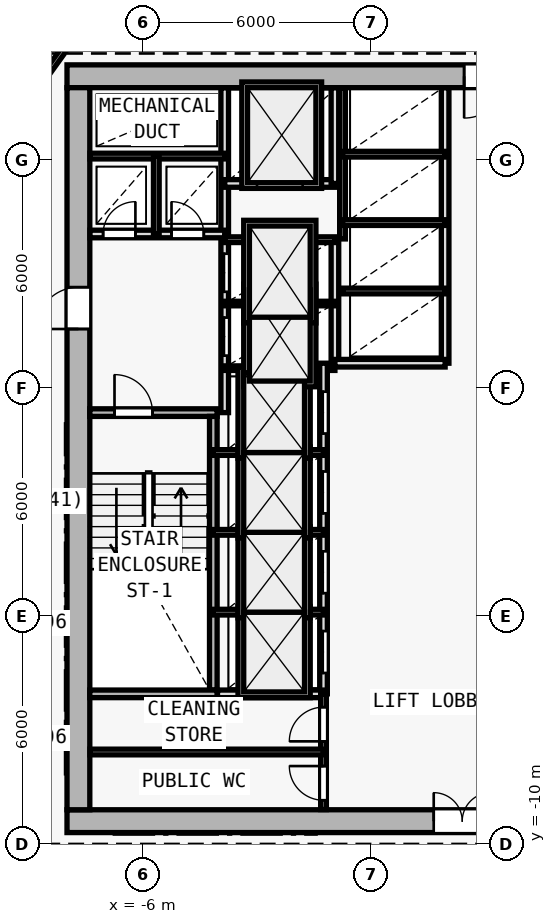
"""IFC4 building model, lengths in metres.
Left out: names, types, materials, properties, quantities, classifications, styles, units other than length and angle.
Written with IfcOpenShell. Run it as: python <this file> out.ifc"""

import sys

from ifc_helpers import new_model, si_unit, direction, frame, frame_2d, origin, origin_2d, place, context, subcontext, project, spatial, rectangle, i_section, extrude, element, fill, save


model = new_model("IFC4")
c1 = context("Model", 3, precision=1e-05, world=origin(), true_north=direction((0.0, 1.0)))
c2 = subcontext(c1, "Body", "Model", "MODEL_VIEW")
j1 = project(units=[si_unit("LENGTHUNIT", "METRE"), si_unit("PLANEANGLEUNIT", "RADIAN")], contexts=[c1])
p1 = place(None, origin())
s1 = spatial("IfcSite", under=j1, at=p1, CompositionType="ELEMENT")
p2 = place(p1, origin())
s2 = spatial("IfcBuilding", under=s1, at=p2, CompositionType="ELEMENT")
p3 = place(p2, frame((0.0, 0.0, 82.5)))
s3 = spatial("IfcBuildingStorey", under=s2, at=p3, CompositionType="ELEMENT", Elevation=82.5)
for number, where, z_axis, x_axis in (
    (1, (-7.7, -9.4, 0.0), (0.0, 0.0, 1.0), (1.0, 0.0, 0.0)),
    (2, (-7.7, 10.2, 0.0), (0.0, 0.0, 1.0), (1.0, 0.0, 0.0)),
    (3, (0.0, -9.4, 0.0), (0.0, 0.0, 1.0), (1.0, 0.0, 0.0)),
    (4, (-7.7, 2.0, 0.0), (0.0, 0.0, 1.0), (1.0, 0.0, 0.0)),
):
    element("IfcColumn", number, at=place(p3, frame(where, z_axis=z_axis, x_axis=x_axis)), inside=s3, PredefinedType="COLUMN", context=c2, shape_type="SweptSolid", body=[
        extrude(i_section(OverallWidth=0.409, OverallDepth=0.425, WebThickness=0.021, FlangeThickness=0.034, FilletRadius=0.015, at=origin_2d()), origin(), (0.0, 0.0, 1.0), 3.6),
    ])
p4 = place(p3, frame((-8.0, -9.4, 0.0), z_axis=(0.0, 0.0, 1.0), x_axis=(1.0, 0.0, 0.0)))
e5 = element("IfcWall", 5, at=p4, inside=s3, PredefinedType="SHEAR", context=c2, shape_type="SweptSolid", body=[
    extrude(rectangle(XDim=16.0, YDim=0.6, at=frame_2d((8.0, 0.0))), origin(), (0.0, 0.0, 1.0), 3.35),
])
p5 = place(p4, frame((9.65, 0.0, 0.0)))
e6 = element("IfcOpeningElement", 6, at=p5, cuts=e5, PredefinedType="OPENING", context=c2, shape_type="SweptSolid", body=[
    extrude(rectangle(XDim=1.5, YDim=2.2, at=frame_2d((0.75, 1.1))), frame((0.0, 0.31, 0.0), z_axis=(0.0, -1.0, 0.0), x_axis=(1.0, 0.0, 0.0)), (0.0, 0.0, 1.0), 0.62),
])
p6 = place(p3, frame((8.0, 10.2, 0.0), z_axis=(0.0, 0.0, 1.0), x_axis=(-1.0, 0.0, 0.0)))
e7 = element("IfcWall", 7, at=p6, inside=s3, PredefinedType="SHEAR", context=c2, shape_type="SweptSolid", body=[
    extrude(rectangle(XDim=16.0, YDim=0.6, at=frame_2d((8.0, 0.0))), origin(), (0.0, 0.0, 1.0), 3.35),
])
p7 = place(p6, frame((4.45, 0.0, 0.0)))
e8 = element("IfcOpeningElement", 8, at=p7, cuts=e7, PredefinedType="OPENING", context=c2, shape_type="SweptSolid", body=[
    extrude(rectangle(XDim=1.1, YDim=2.15, at=frame_2d((0.55, 1.075))), frame((0.0, 0.31, 0.0), z_axis=(0.0, -1.0, 0.0), x_axis=(1.0, 0.0, 0.0)), (0.0, 0.0, 1.0), 0.62),
])
p8 = place(p3, frame((-7.7, -9.1, 0.0), z_axis=(0.0, 0.0, 1.0), x_axis=(0.0, 1.0, 0.0)))
e9 = element("IfcWall", 9, at=p8, inside=s3, PredefinedType="SHEAR", context=c2, shape_type="SweptSolid", body=[
    extrude(rectangle(XDim=19.0, YDim=0.6, at=frame_2d((9.5, 0.0))), origin(), (0.0, 0.0, 1.0), 3.35),
])
p9 = place(p8, frame((12.65, 0.0, 0.0)))
e10 = element("IfcOpeningElement", 10, at=p9, cuts=e9, PredefinedType="OPENING", context=c2, shape_type="SweptSolid", body=[
    extrude(rectangle(XDim=1.1, YDim=2.15, at=frame_2d((0.55, 1.075))), frame((0.0, 0.31, 0.0), z_axis=(0.0, -1.0, 0.0), x_axis=(1.0, 0.0, 0.0)), (0.0, 0.0, 1.0), 0.62),
])
p10 = place(p3, frame((-7.4, 1.35, 0.0), z_axis=(0.0, 0.0, 1.0), x_axis=(1.0, 0.0, 0.0)))
e11 = element("IfcWall", 11, at=p10, inside=s3, PredefinedType="SOLIDWALL", context=c2, shape_type="SweptSolid", body=[
    extrude(rectangle(XDim=3.35, YDim=0.2, at=frame_2d((1.675, 0.0))), origin(), (0.0, 0.0, 1.0), 3.35),
])
p11 = place(p10, frame((0.65, 0.0, 0.0)))
e12 = element("IfcOpeningElement", 12, at=p11, cuts=e11, PredefinedType="OPENING", context=c2, shape_type="SweptSolid", body=[
    extrude(rectangle(XDim=1.0, YDim=2.15, at=frame_2d((0.5, 1.075))), frame((0.0, 0.11, 0.0), z_axis=(0.0, -1.0, 0.0), x_axis=(1.0, 0.0, 0.0)), (0.0, 0.0, 1.0), 0.22),
])
p12 = place(p3, frame((-4.15, -5.95, 0.0), z_axis=(0.0, 0.0, 1.0), x_axis=(0.0, 1.0, 0.0)))
e13 = element("IfcWall", 13, at=p12, inside=s3, PredefinedType="SOLIDWALL", context=c2, shape_type="SweptSolid", body=[
    extrude(rectangle(XDim=7.2, YDim=0.2, at=frame_2d((3.6, 0.0))), origin(), (0.0, 0.0, 1.0), 3.35),
])
p13 = place(p3, frame((-3.85, 1.35, 0.0), z_axis=(0.0, 0.0, 1.0), x_axis=(0.0, 1.0, 0.0)))
e14 = element("IfcWall", 14, at=p13, inside=s3, PredefinedType="SOLIDWALL", context=c2, shape_type="SweptSolid", body=[
    extrude(rectangle(XDim=8.545, YDim=0.2, at=frame_2d((4.272, 0.0))), origin(), (0.0, 0.0, 1.0), 3.35),
])
p14 = place(p13, frame((1.5, 0.0, 0.0)))
e15 = element("IfcOpeningElement", 15, at=p14, cuts=e14, PredefinedType="OPENING", context=c2, shape_type="SweptSolid", body=[
    extrude(rectangle(XDim=1.0, YDim=2.15, at=frame_2d((0.5, 1.075))), frame((0.0, 0.11, 0.0), z_axis=(0.0, -1.0, 0.0), x_axis=(1.0, 0.0, 0.0)), (0.0, 0.0, 1.0), 0.22),
])
p15 = place(p13, frame((3.18, 0.0, 0.0)))
e16 = element("IfcOpeningElement", 16, at=p15, cuts=e14, PredefinedType="OPENING", context=c2, shape_type="SweptSolid", body=[
    extrude(rectangle(XDim=1.0, YDim=2.15, at=frame_2d((0.5, 1.075))), frame((0.0, 0.11, 0.0), z_axis=(0.0, -1.0, 0.0), x_axis=(1.0, 0.0, 0.0)), (0.0, 0.0, 1.0), 0.22),
])
p16 = place(p3, frame((-7.395, 6.05, 0.0), z_axis=(0.0, 0.0, 1.0), x_axis=(1.0, 0.0, 0.0)))
e17 = element("IfcWall", 17, at=p16, inside=s3, PredefinedType="SOLIDWALL", context=c2, shape_type="SweptSolid", body=[
    extrude(rectangle(XDim=3.545, YDim=0.2, at=frame_2d((1.772, 0.0))), origin(), (0.0, 0.0, 1.0), 3.35),
])
p17 = place(p16, frame((0.345, 0.0, 0.0)))
e18 = element("IfcOpeningElement", 18, at=p17, cuts=e17, PredefinedType="OPENING", context=c2, shape_type="SweptSolid", body=[
    extrude(rectangle(XDim=0.85, YDim=2.1, at=frame_2d((0.425, 1.05))), frame((0.0, 0.11, 0.0), z_axis=(0.0, -1.0, 0.0), x_axis=(1.0, 0.0, 0.0)), (0.0, 0.0, 1.0), 0.22),
])
p18 = place(p16, frame((2.145, 0.0, 0.0)))
e19 = element("IfcOpeningElement", 19, at=p18, cuts=e17, PredefinedType="OPENING", context=c2, shape_type="SweptSolid", body=[
    extrude(rectangle(XDim=0.85, YDim=2.1, at=frame_2d((0.425, 1.05))), frame((0.0, 0.11, 0.0), z_axis=(0.0, -1.0, 0.0), x_axis=(1.0, 0.0, 0.0)), (0.0, 0.0, 1.0), 0.22),
])
p19 = place(p3, frame((-7.395, 8.1, 0.0), z_axis=(0.0, 0.0, 1.0), x_axis=(1.0, 0.0, 0.0)))
e20 = element("IfcWall", 20, at=p19, inside=s3, PredefinedType="PARTITIONING", context=c2, shape_type="SweptSolid", body=[
    extrude(rectangle(XDim=3.545, YDim=0.15, at=frame_2d((1.772, 0.0))), origin(), (0.0, 0.0, 1.0), 3.35),
])
p20 = place(p3, frame((-5.65, 6.05, 0.0), z_axis=(0.0, 0.0, 1.0), x_axis=(0.0, 1.0, 0.0)))
e21 = element("IfcWall", 21, at=p20, inside=s3, PredefinedType="PARTITIONING", context=c2, shape_type="SweptSolid", body=[
    extrude(rectangle(XDim=2.05, YDim=0.15, at=frame_2d((1.025, 0.0))), origin(), (0.0, 0.0, 1.0), 3.35),
])
p21 = place(p3, frame((-0.95, 2.65, 0.0), z_axis=(0.0, 0.0, 1.0), x_axis=(0.0, 1.0, 0.0)))
e22 = element("IfcWall", 22, at=p21, inside=s3, PredefinedType="SOLIDWALL", context=c2, shape_type="SweptSolid", body=[
    extrude(rectangle(XDim=3.27, YDim=0.2, at=frame_2d((1.635, 0.0))), origin(), (0.0, 0.0, 1.0), 3.35),
])
for number, where, z_axis, x_axis in (
    (23, (-3.85, 2.52, 0.0), (0.0, 0.0, 1.0), (1.0, 0.0, 0.0)),
    (24, (-3.85, 4.22, 0.0), (0.0, 0.0, 1.0), (1.0, 0.0, 0.0)),
):
    element("IfcWall", number, at=place(p3, frame(where, z_axis=z_axis, x_axis=x_axis)), inside=s3, PredefinedType="PARTITIONING", context=c2, shape_type="SweptSolid", body=[
        extrude(rectangle(XDim=2.9, YDim=0.12, at=frame_2d((1.45, 0.0))), origin(), (0.0, 0.0, 1.0), 3.35),
    ])
p22 = place(p3, frame((-3.85, 5.9, 0.0), z_axis=(0.0, 0.0, 1.0), x_axis=(1.0, 0.0, 0.0)))
e25 = element("IfcWall", 25, at=p22, inside=s3, PredefinedType="PARTITIONING", context=c2, shape_type="SweptSolid", body=[
    extrude(rectangle(XDim=2.9, YDim=0.15, at=frame_2d((1.45, 0.0))), origin(), (0.0, 0.0, 1.0), 3.35),
])
p23 = place(p3, frame((-3.85, 7.38, 0.0), z_axis=(0.0, 0.0, 1.0), x_axis=(1.0, 0.0, 0.0)))
e26 = element("IfcWall", 26, at=p23, inside=s3, PredefinedType="SOLIDWALL", context=c2, shape_type="SweptSolid", body=[
    extrude(rectangle(XDim=2.9, YDim=0.2, at=frame_2d((1.45, 0.0))), origin(), (0.0, 0.0, 1.0), 3.35),
])
p24 = place(p23, frame((0.85, 0.0, 0.0)))
e27 = element("IfcOpeningElement", 27, at=p24, cuts=e26, PredefinedType="OPENING", context=c2, shape_type="SweptSolid", body=[
    extrude(rectangle(XDim=1.2, YDim=2.2, at=frame_2d((0.6, 1.1))), frame((0.0, 0.11, 0.0), z_axis=(0.0, -1.0, 0.0), x_axis=(1.0, 0.0, 0.0)), (0.0, 0.0, 1.0), 0.22),
])
p25 = place(p3, frame((-0.95, 7.38, 0.0), z_axis=(0.0, 0.0, 1.0), x_axis=(0.0, 1.0, 0.0)))
e28 = element("IfcWall", 28, at=p25, inside=s3, PredefinedType="SOLIDWALL", context=c2, shape_type="SweptSolid", body=[
    extrude(rectangle(XDim=2.515, YDim=0.2, at=frame_2d((1.258, 0.0))), origin(), (0.0, 0.0, 1.0), 3.35),
])
p26 = place(p3, frame((-1.25, -6.05, 0.0), z_axis=(0.0, 0.0, 1.0), x_axis=(0.0, 1.0, 0.0)))
e29 = element("IfcWall", 29, at=p26, inside=s3, PredefinedType="SOLIDWALL", context=c2, shape_type="SweptSolid", body=[
    extrude(rectangle(XDim=8.7, YDim=0.2, at=frame_2d((4.35, 0.0))), origin(), (0.0, 0.0, 1.0), 3.35),
])
p27 = place(p26, frame((0.55, 0.0, 0.0)))
e30 = element("IfcOpeningElement", 30, at=p27, cuts=e29, PredefinedType="OPENING", context=c2, shape_type="SweptSolid", body=[
    extrude(rectangle(XDim=1.1, YDim=2.15, at=frame_2d((0.55, 1.075))), frame((0.0, 0.11, 0.0), z_axis=(0.0, -1.0, 0.0), x_axis=(1.0, 0.0, 0.0)), (0.0, 0.0, 1.0), 0.22),
])
p28 = place(p26, frame((2.65, 0.0, 0.0)))
e31 = element("IfcOpeningElement", 31, at=p28, cuts=e29, PredefinedType="OPENING", context=c2, shape_type="SweptSolid", body=[
    extrude(rectangle(XDim=1.1, YDim=2.15, at=frame_2d((0.55, 1.075))), frame((0.0, 0.11, 0.0), z_axis=(0.0, -1.0, 0.0), x_axis=(1.0, 0.0, 0.0)), (0.0, 0.0, 1.0), 0.22),
])
p29 = place(p26, frame((4.75, 0.0, 0.0)))
e32 = element("IfcOpeningElement", 32, at=p29, cuts=e29, PredefinedType="OPENING", context=c2, shape_type="SweptSolid", body=[
    extrude(rectangle(XDim=1.1, YDim=2.15, at=frame_2d((0.55, 1.075))), frame((0.0, 0.11, 0.0), z_axis=(0.0, -1.0, 0.0), x_axis=(1.0, 0.0, 0.0)), (0.0, 0.0, 1.0), 0.22),
])
p30 = place(p26, frame((6.85, 0.0, 0.0)))
e33 = element("IfcOpeningElement", 33, at=p30, cuts=e29, PredefinedType="OPENING", context=c2, shape_type="SweptSolid", body=[
    extrude(rectangle(XDim=1.1, YDim=2.15, at=frame_2d((0.55, 1.075))), frame((0.0, 0.11, 0.0), z_axis=(0.0, -1.0, 0.0), x_axis=(1.0, 0.0, 0.0)), (0.0, 0.0, 1.0), 0.22),
])
for number, where, z_axis, x_axis in (
    (34, (-4.15, -3.9, 0.0), (0.0, 0.0, 1.0), (1.0, 0.0, 0.0)),
    (35, (-4.15, -1.8, 0.0), (0.0, 0.0, 1.0), (1.0, 0.0, 0.0)),
    (36, (-4.15, 0.3, 0.0), (0.0, 0.0, 1.0), (1.0, 0.0, 0.0)),
):
    element("IfcWall", number, at=place(p3, frame(where, z_axis=z_axis, x_axis=x_axis)), inside=s3, PredefinedType="PARTITIONING", context=c2, shape_type="SweptSolid", body=[
        extrude(rectangle(XDim=2.9, YDim=0.15, at=frame_2d((1.45, 0.0))), origin(), (0.0, 0.0, 1.0), 3.35),
    ])
p31 = place(p3, frame((1.95, 2.65, 0.0), z_axis=(0.0, 0.0, 1.0), x_axis=(0.0, 1.0, 0.0)))
e37 = element("IfcWall", 37, at=p31, inside=s3, PredefinedType="SOLIDWALL", context=c2, shape_type="SweptSolid", body=[
    extrude(rectangle(XDim=7.245, YDim=0.2, at=frame_2d((3.623, 0.0))), origin(), (0.0, 0.0, 1.0), 3.35),
])
p32 = place(p3, frame((-0.95, 2.65, 0.0), z_axis=(0.0, 0.0, 1.0), x_axis=(1.0, 0.0, 0.0)))
e38 = element("IfcWall", 38, at=p32, inside=s3, PredefinedType="SOLIDWALL", context=c2, shape_type="SweptSolid", body=[
    extrude(rectangle(XDim=2.9, YDim=0.2, at=frame_2d((1.45, 0.0))), origin(), (0.0, 0.0, 1.0), 3.35),
])
p33 = place(p3, frame((-0.75, 5.92, 0.0), z_axis=(0.0, 0.0, 1.0), x_axis=(0.0, 1.0, 0.0)))
e39 = element("IfcWall", 39, at=p33, inside=s3, PredefinedType="PARTITIONING", context=c2, shape_type="SweptSolid", body=[
    extrude(rectangle(XDim=3.975, YDim=0.15, at=frame_2d((1.988, 0.0))), origin(), (0.0, 0.0, 1.0), 3.35),
])
for number, where, z_axis, x_axis in (
    (40, (-0.75, 4.55, 0.0), (0.0, 0.0, 1.0), (1.0, 0.0, 0.0)),
    (41, (-0.75, 6.35, 0.0), (0.0, 0.0, 1.0), (1.0, 0.0, 0.0)),
    (42, (-0.75, 8.15, 0.0), (0.0, 0.0, 1.0), (1.0, 0.0, 0.0)),
):
    element("IfcWall", number, at=place(p3, frame(where, z_axis=z_axis, x_axis=x_axis)), inside=s3, PredefinedType="PARTITIONING", context=c2, shape_type="SweptSolid", body=[
        extrude(rectangle(XDim=2.7, YDim=0.15, at=frame_2d((1.35, 0.0))), origin(), (0.0, 0.0, 1.0), 3.35),
    ])
p34 = place(p3, frame((-7.4, -6.05, 0.0), z_axis=(0.0, 0.0, 1.0), x_axis=(1.0, 0.0, 0.0)))
e43 = element("IfcWall", 43, at=p34, inside=s3, PredefinedType="SOLIDWALL", context=c2, shape_type="SweptSolid", body=[
    extrude(rectangle(XDim=3.35, YDim=0.2, at=frame_2d((1.675, 0.0))), origin(), (0.0, 0.0, 1.0), 3.35),
])
p35 = place(p3, frame((-4.04, -6.05, 0.0), z_axis=(0.0, 0.0, 1.0), x_axis=(1.0, 0.0, 0.0)))
e44 = element("IfcWall", 44, at=p35, inside=s3, PredefinedType="SOLIDWALL", context=c2, shape_type="SweptSolid", body=[
    extrude(rectangle(XDim=2.79, YDim=0.2, at=frame_2d((1.395, 0.0))), origin(), (0.0, 0.0, 1.0), 3.35),
])
p36 = place(p3, frame((-1.25, -9.095, 0.0), z_axis=(0.0, 0.0, 1.0), x_axis=(0.0, 1.0, 0.0)))
e45 = element("IfcWall", 45, at=p36, inside=s3, PredefinedType="PARTITIONING", context=c2, shape_type="SweptSolid", body=[
    extrude(rectangle(XDim=3.045, YDim=0.15, at=frame_2d((1.522, 0.0))), origin(), (0.0, 0.0, 1.0), 3.35),
])
p37 = place(p36, frame((1.795, 0.0, 0.0)))
e46 = element("IfcOpeningElement", 46, at=p37, cuts=e45, PredefinedType="OPENING", context=c2, shape_type="SweptSolid", body=[
    extrude(rectangle(XDim=0.9, YDim=2.1, at=frame_2d((0.45, 1.05))), frame((0.0, 0.085, 0.0), z_axis=(0.0, -1.0, 0.0), x_axis=(1.0, 0.0, 0.0)), (0.0, 0.0, 1.0), 0.17),
])
p38 = place(p36, frame((0.245, 0.0, 0.0)))
e47 = element("IfcOpeningElement", 47, at=p38, cuts=e45, PredefinedType="OPENING", context=c2, shape_type="SweptSolid", body=[
    extrude(rectangle(XDim=0.9, YDim=2.1, at=frame_2d((0.45, 1.05))), frame((0.0, 0.085, 0.0), z_axis=(0.0, -1.0, 0.0), x_axis=(1.0, 0.0, 0.0)), (0.0, 0.0, 1.0), 0.17),
])
p39 = place(p3, frame((-7.395, -7.58, 0.0), z_axis=(0.0, 0.0, 1.0), x_axis=(1.0, 0.0, 0.0)))
e48 = element("IfcWall", 48, at=p39, inside=s3, PredefinedType="PARTITIONING", context=c2, shape_type="SweptSolid", body=[
    extrude(rectangle(XDim=6.145, YDim=0.15, at=frame_2d((3.073, 0.0))), origin(), (0.0, 0.0, 1.0), 3.35),
])
p40 = place(p3, frame((-9.86, 8.426, 0.0), z_axis=(0.0, 0.0, 1.0), x_axis=(0.582449511476, 0.812866881218, 0.0)))
e49 = element("IfcWall", 49, at=p40, inside=s3, PredefinedType="PARTITIONING", context=c2, shape_type="SweptSolid", body=[
    extrude(rectangle(XDim=4.84, YDim=0.15, at=frame_2d((2.42, 0.0))), origin(), (0.0, 0.0, 1.0), 2.725),
])
p41 = place(p5, origin())
e50 = element("IfcDoor", 50, at=p41, inside=s3, OperationType="DOUBLE_DOOR_SINGLE_SWING", PredefinedType="DOOR", context=c2, shape_type="SweptSolid", body=[
    extrude(rectangle(XDim=1.5, YDim=2.2, at=frame_2d((0.75, 1.1))), frame((0.0, 0.025, 0.0), z_axis=(0.0, -1.0, 0.0), x_axis=(1.0, 0.0, 0.0)), (0.0, 0.0, 1.0), 0.05),
])
fill(e6, e50)
p42 = place(p9, origin())
e51 = element("IfcDoor", 51, at=p42, inside=s3, OperationType="SINGLE_SWING_LEFT", PredefinedType="DOOR", context=c2, shape_type="SweptSolid", body=[
    extrude(rectangle(XDim=1.1, YDim=2.15, at=frame_2d((0.55, 1.075))), frame((0.0, 0.025, 0.0), z_axis=(0.0, -1.0, 0.0), x_axis=(1.0, 0.0, 0.0)), (0.0, 0.0, 1.0), 0.05),
])
fill(e10, e51)
p43 = place(p7, origin())
e52 = element("IfcDoor", 52, at=p43, inside=s3, OperationType="SINGLE_SWING_RIGHT", PredefinedType="DOOR", context=c2, shape_type="SweptSolid", body=[
    extrude(rectangle(XDim=1.1, YDim=2.15, at=frame_2d((0.55, 1.075))), frame((0.0, 0.025, 0.0), z_axis=(0.0, -1.0, 0.0), x_axis=(1.0, 0.0, 0.0)), (0.0, 0.0, 1.0), 0.05),
])
fill(e8, e52)
p44 = place(p11, origin())
e53 = element("IfcDoor", 53, at=p44, inside=s3, OperationType="SINGLE_SWING_LEFT", PredefinedType="DOOR", context=c2, shape_type="SweptSolid", body=[
    extrude(rectangle(XDim=1.0, YDim=2.15, at=frame_2d((0.5, 1.075))), frame((0.0, 0.025, 0.0), z_axis=(0.0, -1.0, 0.0), x_axis=(1.0, 0.0, 0.0)), (0.0, 0.0, 1.0), 0.05),
])
fill(e12, e53)
p45 = place(p17, origin())
e54 = element("IfcDoor", 54, at=p45, inside=s3, OperationType="SINGLE_SWING_RIGHT", PredefinedType="DOOR", context=c2, shape_type="SweptSolid", body=[
    extrude(rectangle(XDim=0.85, YDim=2.1, at=frame_2d((0.425, 1.05))), frame((0.0, 0.025, 0.0), z_axis=(0.0, -1.0, 0.0), x_axis=(1.0, 0.0, 0.0)), (0.0, 0.0, 1.0), 0.05),
])
fill(e18, e54)
p46 = place(p18, origin())
e55 = element("IfcDoor", 55, at=p46, inside=s3, OperationType="SINGLE_SWING_LEFT", PredefinedType="DOOR", context=c2, shape_type="SweptSolid", body=[
    extrude(rectangle(XDim=0.85, YDim=2.1, at=frame_2d((0.425, 1.05))), frame((0.0, 0.025, 0.0), z_axis=(0.0, -1.0, 0.0), x_axis=(1.0, 0.0, 0.0)), (0.0, 0.0, 1.0), 0.05),
])
fill(e19, e55)
p47 = place(p24, origin())
e56 = element("IfcDoor", 56, at=p47, inside=s3, OperationType="DOUBLE_DOOR_SLIDING", PredefinedType="DOOR", context=c2, shape_type="SweptSolid", body=[
    extrude(rectangle(XDim=1.2, YDim=2.2, at=frame_2d((0.6, 1.1))), frame((0.0, 0.025, 0.0), z_axis=(0.0, -1.0, 0.0), x_axis=(1.0, 0.0, 0.0)), (0.0, 0.0, 1.0), 0.05),
])
fill(e27, e56)
p48 = place(p27, origin())
e57 = element("IfcDoor", 57, at=p48, inside=s3, OperationType="DOUBLE_DOOR_SLIDING", PredefinedType="DOOR", context=c2, shape_type="SweptSolid", body=[
    extrude(rectangle(XDim=1.1, YDim=2.15, at=frame_2d((0.55, 1.075))), frame((0.0, 0.025, 0.0), z_axis=(0.0, -1.0, 0.0), x_axis=(1.0, 0.0, 0.0)), (0.0, 0.0, 1.0), 0.05),
])
fill(e30, e57)
p49 = place(p28, origin())
e58 = element("IfcDoor", 58, at=p49, inside=s3, OperationType="DOUBLE_DOOR_SLIDING", PredefinedType="DOOR", context=c2, shape_type="SweptSolid", body=[
    extrude(rectangle(XDim=1.1, YDim=2.15, at=frame_2d((0.55, 1.075))), frame((0.0, 0.025, 0.0), z_axis=(0.0, -1.0, 0.0), x_axis=(1.0, 0.0, 0.0)), (0.0, 0.0, 1.0), 0.05),
])
fill(e31, e58)
p50 = place(p29, origin())
e59 = element("IfcDoor", 59, at=p50, inside=s3, OperationType="DOUBLE_DOOR_SLIDING", PredefinedType="DOOR", context=c2, shape_type="SweptSolid", body=[
    extrude(rectangle(XDim=1.1, YDim=2.15, at=frame_2d((0.55, 1.075))), frame((0.0, 0.025, 0.0), z_axis=(0.0, -1.0, 0.0), x_axis=(1.0, 0.0, 0.0)), (0.0, 0.0, 1.0), 0.05),
])
fill(e32, e59)
p51 = place(p30, origin())
e60 = element("IfcDoor", 60, at=p51, inside=s3, OperationType="DOUBLE_DOOR_SLIDING", PredefinedType="DOOR", context=c2, shape_type="SweptSolid", body=[
    extrude(rectangle(XDim=1.1, YDim=2.15, at=frame_2d((0.55, 1.075))), frame((0.0, 0.025, 0.0), z_axis=(0.0, -1.0, 0.0), x_axis=(1.0, 0.0, 0.0)), (0.0, 0.0, 1.0), 0.05),
])
fill(e33, e60)
p52 = place(p14, origin())
e61 = element("IfcDoor", 61, at=p52, inside=s3, OperationType="DOUBLE_DOOR_SLIDING", PredefinedType="DOOR", context=c2, shape_type="SweptSolid", body=[
    extrude(rectangle(XDim=1.0, YDim=2.15, at=frame_2d((0.5, 1.075))), frame((0.0, 0.025, 0.0), z_axis=(0.0, -1.0, 0.0), x_axis=(1.0, 0.0, 0.0)), (0.0, 0.0, 1.0), 0.05),
])
fill(e15, e61)
p53 = place(p15, origin())
e62 = element("IfcDoor", 62, at=p53, inside=s3, OperationType="DOUBLE_DOOR_SLIDING", PredefinedType="DOOR", context=c2, shape_type="SweptSolid", body=[
    extrude(rectangle(XDim=1.0, YDim=2.15, at=frame_2d((0.5, 1.075))), frame((0.0, 0.025, 0.0), z_axis=(0.0, -1.0, 0.0), x_axis=(1.0, 0.0, 0.0)), (0.0, 0.0, 1.0), 0.05),
])
fill(e16, e62)
p54 = place(p37, origin())
e63 = element("IfcDoor", 63, at=p54, inside=s3, OperationType="SINGLE_SWING_LEFT", PredefinedType="DOOR", context=c2, shape_type="SweptSolid", body=[
    extrude(rectangle(XDim=0.9, YDim=2.1, at=frame_2d((0.45, 1.05))), frame((0.0, 0.025, 0.0), z_axis=(0.0, -1.0, 0.0), x_axis=(1.0, 0.0, 0.0)), (0.0, 0.0, 1.0), 0.05),
])
fill(e46, e63)
p55 = place(p38, origin())
e64 = element("IfcDoor", 64, at=p55, inside=s3, OperationType="SINGLE_SWING_RIGHT", PredefinedType="DOOR", context=c2, shape_type="SweptSolid", body=[
    extrude(rectangle(XDim=0.9, YDim=2.1, at=frame_2d((0.45, 1.05))), frame((0.0, 0.025, 0.0), z_axis=(0.0, -1.0, 0.0), x_axis=(1.0, 0.0, 0.0)), (0.0, 0.0, 1.0), 0.05),
])
fill(e47, e64)
save(model, sys.argv[1])
